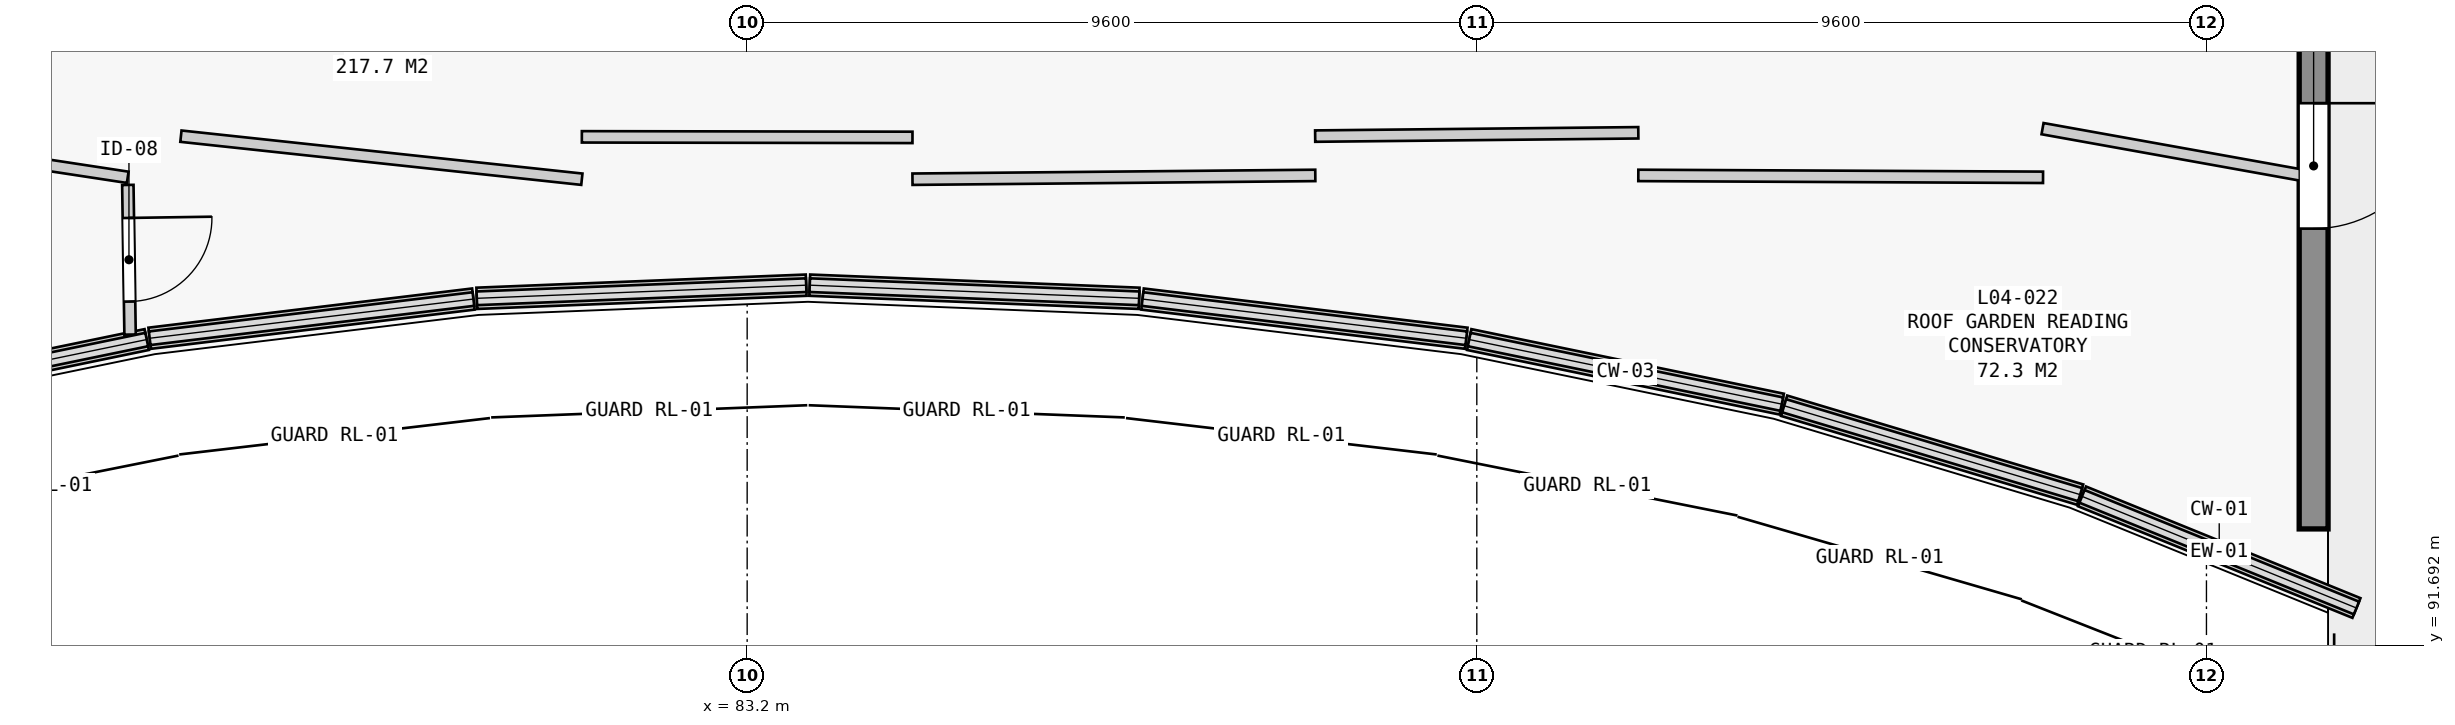
"""IFC4 building model, lengths in metres.
Left out: names, types, materials, properties, quantities, classifications, styles, units other than length and angle.
Written with IfcOpenShell. Run it as: python <this file> out.ifc"""

import sys

from ifc_helpers import new_model, si_unit, direction, frame, frame_2d, origin, place, context, subcontext, project, spatial, rectangle, extrude, element, fill, save


model = new_model("IFC4")
c1 = context("Model", 3, precision=1e-05, world=origin(), true_north=direction((0.0, 1.0)))
c2 = subcontext(c1, "Body", "Model", "MODEL_VIEW")
j1 = project(units=[si_unit("LENGTHUNIT", "METRE"), si_unit("PLANEANGLEUNIT", "RADIAN")], contexts=[c1])
p1 = place(None, origin())
s1 = spatial("IfcSite", under=j1, at=p1, CompositionType="ELEMENT")
p2 = place(p1, origin())
s2 = spatial("IfcBuilding", under=s1, at=p2, CompositionType="ELEMENT")
p3 = place(p2, frame((0.0, 0.0, 18.3)))
s3 = spatial("IfcBuildingStorey", under=s2, at=p3, CompositionType="ELEMENT", Elevation=18.3)
p4 = place(p3, frame((104.374, 92.184, 0.0), z_axis=(0.0, 0.0, 1.0), x_axis=(-0.926279468924, 0.376837293071, 0.0)))
e1 = element("IfcWall", 1, at=p4, inside=s3, PredefinedType="STANDARD", context=c2, shape_type="SweptSolid", body=[
    extrude(rectangle(XDim=3.898, YDim=0.28, at=frame_2d((1.949, 0.0))), origin(), (0.0, 0.0, 1.0), 0.72),
])
p5 = place(p3, frame((100.739, 93.675, 0.0), z_axis=(0.0, 0.0, 1.0), x_axis=(-0.957763475746, 0.287557167408, 0.0)))
e2 = element("IfcWall", 2, at=p5, inside=s3, PredefinedType="STANDARD", context=c2, shape_type="SweptSolid", body=[
    extrude(rectangle(XDim=4.067, YDim=0.28, at=frame_2d((2.033, 0.0))), origin(), (0.0, 0.0, 1.0), 0.72),
])
p6 = place(p3, frame((96.812, 94.866, 0.0), z_axis=(0.0, 0.0, 1.0), x_axis=(-0.979306137349, 0.202384508674, 0.0)))
e3 = element("IfcWall", 3, at=p6, inside=s3, PredefinedType="STANDARD", context=c2, shape_type="SweptSolid", body=[
    extrude(rectangle(XDim=4.199, YDim=0.28, at=frame_2d((2.1, 0.0))), origin(), (0.0, 0.0, 1.0), 0.72),
])
p7 = place(p3, frame((92.661, 95.733, 0.0), z_axis=(0.0, 0.0, 1.0), x_axis=(-0.992745106913, 0.12023790043, 0.0)))
e4 = element("IfcWall", 4, at=p7, inside=s3, PredefinedType="STANDARD", context=c2, shape_type="SweptSolid", body=[
    extrude(rectangle(XDim=4.29, YDim=0.28, at=frame_2d((2.145, 0.0))), origin(), (0.0, 0.0, 1.0), 0.72),
])
for number, where, z_axis, x_axis in (
    (5, (88.357, 96.258, 0.0), (0.0, 0.0, 1.0), (-0.999, 0.04, 0.0)),
    (6, (83.977, 96.431, 0.0), (0.0, 0.0, 1.0), (-0.999, -0.04, 0.0)),
):
    element("IfcWall", number, at=place(p3, frame(where, z_axis=z_axis, x_axis=x_axis)), inside=s3, PredefinedType="STANDARD", context=c2, shape_type="SweptSolid", body=[
        extrude(rectangle(XDim=4.337, YDim=0.28, at=frame_2d((2.168, 0.0))), origin(), (0.0, 0.0, 1.0), 0.72),
    ])
p8 = place(p3, frame((79.598, 96.249, 0.0), z_axis=(0.0, 0.0, 1.0), x_axis=(-0.992745106913, -0.12023790043, 0.0)))
e7 = element("IfcWall", 7, at=p8, inside=s3, PredefinedType="STANDARD", context=c2, shape_type="SweptSolid", body=[
    extrude(rectangle(XDim=4.29, YDim=0.28, at=frame_2d((2.145, 0.0))), origin(), (0.0, 0.0, 1.0), 0.72),
])
p9 = place(p3, frame((75.3, 95.716, 0.0), z_axis=(0.0, 0.0, 1.0), x_axis=(-0.979306137349, -0.202384508674, 0.0)))
e8 = element("IfcWall", 8, at=p9, inside=s3, PredefinedType="STANDARD", context=c2, shape_type="SweptSolid", body=[
    extrude(rectangle(XDim=4.199, YDim=0.28, at=frame_2d((2.1, 0.0))), origin(), (0.0, 0.0, 1.0), 0.72),
])
p10 = place(p3, frame((103.81, 113.81, 0.0), z_axis=(0.0, 0.0, 1.0), x_axis=(0.0, -1.0, 0.0)))
e9 = element("IfcWall", 9, at=p10, inside=s3, PredefinedType="STANDARD", context=c2, shape_type="SweptSolid", body=[
    extrude(rectangle(XDim=20.586, YDim=0.38, at=frame_2d((10.293, 0.0))), origin(), (0.0, 0.0, 1.0), 3.94),
])
p11 = place(p10, frame((14.985, 0.0, 0.0)))
e10 = element("IfcOpeningElement", 10, at=p11, cuts=e9, PredefinedType="OPENING", context=c2, shape_type="SweptSolid", body=[
    extrude(rectangle(XDim=1.65, YDim=2.3, at=frame_2d((0.825, 1.15))), frame((0.0, 0.2, 0.0), z_axis=(0.0, -1.0, 0.0), x_axis=(1.0, 0.0, 0.0)), (0.0, 0.0, 1.0), 0.4),
])
p12 = place(p10, frame((7.405, 0.0, 1.05)))
e11 = element("IfcOpeningElement", 11, at=p12, cuts=e9, PredefinedType="OPENING", context=c2, shape_type="SweptSolid", body=[
    extrude(rectangle(XDim=1.8, YDim=2.5, at=frame_2d((0.9, 1.25))), frame((0.0, 0.2, 0.0), z_axis=(0.0, -1.0, 0.0), x_axis=(1.0, 0.0, 0.0)), (0.0, 0.0, 1.0), 0.4),
])
p13 = place(p3, frame((71.45, 98.398, 0.0), z_axis=(0.0, 0.0, 1.0), x_axis=(0.988598452518, -0.150575893419, 0.0)))
e12 = element("IfcWall", 12, at=p13, inside=s3, PredefinedType="PARTITIONING", context=c2, shape_type="SweptSolid", body=[
    extrude(rectangle(XDim=3.642, YDim=0.15, at=frame_2d((1.821, 0.0))), origin(), (0.0, 0.0, 1.0), 3.94),
])
p14 = place(p3, frame((75.052, 97.75, 0.0), z_axis=(0.0, 0.0, 1.0), x_axis=(0.0148774605, -0.99988932446, 0.0)))
e13 = element("IfcWall", 13, at=p14, inside=s3, PredefinedType="PARTITIONING", context=c2, shape_type="SweptSolid", body=[
    extrude(rectangle(XDim=1.969, YDim=0.15, at=frame_2d((0.985, 0.0))), origin(), (0.0, 0.0, 1.0), 3.94),
])
p15 = place(p14, frame((0.435, 0.0, 0.0)))
e14 = element("IfcOpeningElement", 14, at=p15, cuts=e13, PredefinedType="OPENING", context=c2, shape_type="SweptSolid", body=[
    extrude(rectangle(XDim=1.1, YDim=2.2, at=frame_2d((0.55, 1.1))), frame((0.0, 0.085, 0.0), z_axis=(0.0, -1.0, 0.0), x_axis=(1.0, 0.0, 0.0)), (0.0, 0.0, 1.0), 0.17),
])
p16 = place(p3, frame((75.75, 98.391, 0.0), z_axis=(0.0, 0.0, 1.0), x_axis=(0.994284405771, -0.106763853623, 0.0)))
e15 = element("IfcWall", 15, at=p16, inside=s3, PredefinedType="PARTITIONING", context=c2, shape_type="SweptSolid", body=[
    extrude(rectangle(XDim=5.305, YDim=0.15, at=frame_2d((2.653, 0.0))), origin(), (0.0, 0.0, 1.0), 3.94),
])
p17 = place(p3, frame((81.025, 98.383, 0.0), z_axis=(0.0, 0.0, 1.0), x_axis=(0.999998582596, -0.001683688263, 0.0)))
e16 = element("IfcWall", 16, at=p17, inside=s3, PredefinedType="PARTITIONING", context=c2, shape_type="SweptSolid", body=[
    extrude(rectangle(XDim=4.35, YDim=0.15, at=frame_2d((2.175, 0.0))), origin(), (0.0, 0.0, 1.0), 3.94),
])
p18 = place(p3, frame((85.375, 97.825, 0.0), z_axis=(0.0, 0.0, 1.0), x_axis=(0.999955417025, 0.009442667119, 0.0)))
e17 = element("IfcWall", 17, at=p18, inside=s3, PredefinedType="PARTITIONING", context=c2, shape_type="SweptSolid", body=[
    extrude(rectangle(XDim=5.3, YDim=0.15, at=frame_2d((2.65, 0.0))), origin(), (0.0, 0.0, 1.0), 3.94),
])
p19 = place(p3, frame((90.673, 98.392, 0.0), z_axis=(0.0, 0.0, 1.0), x_axis=(0.99994718045, 0.010277952644, 0.0)))
e18 = element("IfcWall", 18, at=p19, inside=s3, PredefinedType="PARTITIONING", context=c2, shape_type="SweptSolid", body=[
    extrude(rectangle(XDim=4.252, YDim=0.15, at=frame_2d((2.126, 0.0))), origin(), (0.0, 0.0, 1.0), 3.94),
])
p20 = place(p3, frame((94.925, 97.875, 0.0), z_axis=(0.0, 0.0, 1.0), x_axis=(0.999989065169, -0.004676488224, 0.0)))
e19 = element("IfcWall", 19, at=p20, inside=s3, PredefinedType="PARTITIONING", context=c2, shape_type="SweptSolid", body=[
    extrude(rectangle(XDim=5.325, YDim=0.15, at=frame_2d((2.663, 0.0))), origin(), (0.0, 0.0, 1.0), 3.94),
])
p21 = place(p3, frame((100.243, 98.49, 0.0), z_axis=(0.0, 0.0, 1.0), x_axis=(0.9842566848, -0.176744953043, 0.0)))
e20 = element("IfcWall", 20, at=p21, inside=s3, PredefinedType="PARTITIONING", context=c2, shape_type="SweptSolid", body=[
    extrude(rectangle(XDim=3.524, YDim=0.15, at=frame_2d((1.762, 0.0))), origin(), (0.0, 0.0, 1.0), 3.94),
])
p22 = place(p11, origin())
e21 = element("IfcDoor", 21, at=p22, inside=s3, OperationType="SINGLE_SWING_LEFT", PredefinedType="DOOR", context=c2, shape_type="SweptSolid", body=[
    extrude(rectangle(XDim=1.65, YDim=2.3, at=frame_2d((0.825, 1.15))), frame((0.0, 0.025, 0.0), z_axis=(0.0, -1.0, 0.0), x_axis=(1.0, 0.0, 0.0)), (0.0, 0.0, 1.0), 0.05),
])
fill(e10, e21)
p23 = place(p15, origin())
e22 = element("IfcDoor", 22, at=p23, inside=s3, OperationType="SINGLE_SWING_LEFT", PredefinedType="DOOR", context=c2, shape_type="SweptSolid", body=[
    extrude(rectangle(XDim=1.1, YDim=2.2, at=frame_2d((0.55, 1.1))), frame((0.0, 0.025, 0.0), z_axis=(0.0, -1.0, 0.0), x_axis=(1.0, 0.0, 0.0)), (0.0, 0.0, 1.0), 0.05),
])
fill(e14, e22)
save(model, sys.argv[1])
